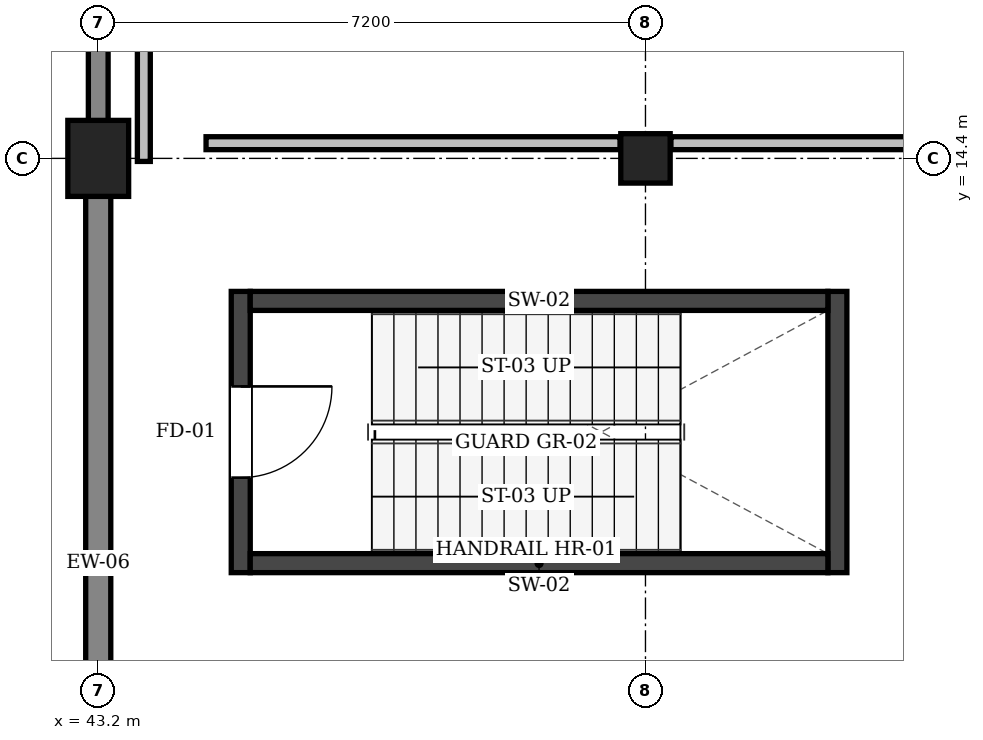
"""IFC4 building model, lengths in metres.
Left out: names, types, materials, properties, quantities, classifications, styles, units other than length and angle.
Written with IfcOpenShell. Run it as: python <this file> out.ifc"""

import sys

from ifc_helpers import new_model, si_unit, direction, frame, frame_2d, origin, origin_2d, place, context, subcontext, project, spatial, rectangle, extrude, element, fill, save


model = new_model("IFC4")
c1 = context("Model", 3, precision=1e-05, world=origin(), true_north=direction((0.0, 1.0)))
c2 = subcontext(c1, "Body", "Model", "MODEL_VIEW")
j1 = project(units=[si_unit("LENGTHUNIT", "METRE"), si_unit("PLANEANGLEUNIT", "RADIAN")], contexts=[c1])
p1 = place(None, origin())
s1 = spatial("IfcSite", under=j1, at=p1, CompositionType="ELEMENT")
p2 = place(p1, origin())
s2 = spatial("IfcBuilding", under=s1, at=p2, CompositionType="ELEMENT")
p3 = place(p2, frame((0.0, 0.0, 23.4)))
s3 = spatial("IfcBuildingStorey", under=s2, at=p3, CompositionType="ELEMENT", Elevation=23.4)
p4 = place(p3, frame((43.2, 14.4, 0.0), z_axis=(0.0, 0.0, 1.0), x_axis=(1.0, 0.0, 0.0)))
e1 = element("IfcColumn", 1, at=p4, inside=s3, PredefinedType="COLUMN", context=c2, shape_type="SweptSolid", body=[
    extrude(rectangle(XDim=0.8, YDim=1.0, at=origin_2d()), origin(), (0.0, 0.0, 1.0), 4.5),
])
p5 = place(p3, frame((50.4, 14.4, 0.0), z_axis=(0.0, 0.0, 1.0), x_axis=(1.0, 0.0, 0.0)))
e2 = element("IfcColumn", 2, at=p5, inside=s3, PredefinedType="COLUMN", context=c2, shape_type="SweptSolid", body=[
    extrude(rectangle(XDim=0.65, YDim=0.65, at=origin_2d()), origin(), (0.0, 0.0, 1.0), 4.5),
])
p6 = place(p3, frame((43.2, 7.2, 0.0), z_axis=(0.0, 0.0, 1.0), x_axis=(0.0, 1.0, 0.0)))
e3 = element("IfcWall", 3, at=p6, inside=s3, PredefinedType="SOLIDWALL", context=c2, shape_type="SweptSolid", body=[
    extrude(rectangle(XDim=7.2, YDim=0.33, at=frame_2d((3.6, 0.0))), origin(), (0.0, 0.0, 1.0), 4.22),
])
p7 = place(p3, frame((43.2, 14.4, 0.0), z_axis=(0.0, 0.0, 1.0), x_axis=(0.0, 1.0, 0.0)))
e4 = element("IfcWall", 4, at=p7, inside=s3, PredefinedType="SOLIDWALL", context=c2, shape_type="SweptSolid", body=[
    extrude(rectangle(XDim=7.2, YDim=0.26, at=frame_2d((3.6, 0.0))), origin(), (0.0, 0.0, 1.0), 4.22),
])
p8 = place(p7, frame((1.715, 0.0, 0.95)))
e5 = element("IfcOpeningElement", 5, at=p8, cuts=e4, PredefinedType="OPENING", context=c2, shape_type="SweptSolid", body=[
    extrude(rectangle(XDim=1.7, YDim=1.8, at=frame_2d((0.85, 0.9))), frame((0.0, 0.142, 0.0), z_axis=(0.0, -1.0, 0.0), x_axis=(1.0, 0.0, 0.0)), (0.0, 0.0, 1.0), 0.284),
])
p9 = place(p3, frame((45.075, 8.95, 0.0), z_axis=(0.0, 0.0, 1.0), x_axis=(0.0, 1.0, 0.0)))
e6 = element("IfcWall", 6, at=p9, inside=s3, PredefinedType="SHEAR", context=c2, shape_type="SweptSolid", body=[
    extrude(rectangle(XDim=3.7, YDim=0.25, at=frame_2d((1.85, 0.0))), origin(), (0.0, 0.0, 1.0), 4.25),
])
p10 = place(p9, frame((1.25, 0.0, 0.0)))
e7 = element("IfcOpeningElement", 7, at=p10, cuts=e6, PredefinedType="OPENING", context=c2, shape_type="SweptSolid", body=[
    extrude(rectangle(XDim=1.2, YDim=2.15, at=frame_2d((0.6, 1.075))), frame((0.0, 0.137, 0.0), z_axis=(0.0, -1.0, 0.0), x_axis=(1.0, 0.0, 0.0)), (0.0, 0.0, 1.0), 0.274),
])
p11 = place(p3, frame((52.925, 8.95, 0.0), z_axis=(0.0, 0.0, 1.0), x_axis=(0.0, 1.0, 0.0)))
e8 = element("IfcWall", 8, at=p11, inside=s3, PredefinedType="SHEAR", context=c2, shape_type="SweptSolid", body=[
    extrude(rectangle(XDim=3.7, YDim=0.25, at=frame_2d((1.85, 0.0))), origin(), (0.0, 0.0, 1.0), 4.25),
])
for number, where, z_axis, x_axis in (
    (9, (45.2, 9.075, 0.0), (0.0, 0.0, 1.0), (1.0, 0.0, 0.0)),
    (10, (45.2, 12.525, 0.0), (0.0, 0.0, 1.0), (1.0, 0.0, 0.0)),
):
    element("IfcWall", number, at=place(p3, frame(where, z_axis=z_axis, x_axis=x_axis)), inside=s3, PredefinedType="SHEAR", context=c2, shape_type="SweptSolid", body=[
        extrude(rectangle(XDim=7.6, YDim=0.25, at=frame_2d((3.8, 0.0))), origin(), (0.0, 0.0, 1.0), 4.25),
    ])
p12 = place(p3, frame((50.735, 14.6, 0.0), z_axis=(0.0, 0.0, 1.0), x_axis=(1.0, 0.0, 0.0)))
e11 = element("IfcWall", 11, at=p12, inside=s3, PredefinedType="PARTITIONING", context=c2, shape_type="SweptSolid", body=[
    extrude(rectangle(XDim=6.53, YDim=0.17, at=frame_2d((3.265, 0.0))), origin(), (0.0, 0.0, 1.0), 3.73),
])
p13 = place(p3, frame((44.618, 14.6, 0.0), z_axis=(0.0, 0.0, 1.0), x_axis=(1.0, 0.0, 0.0)))
e12 = element("IfcWall", 12, at=p13, inside=s3, PredefinedType="PARTITIONING", context=c2, shape_type="SweptSolid", body=[
    extrude(rectangle(XDim=5.447, YDim=0.17, at=frame_2d((2.723, 0.0))), origin(), (0.0, 0.0, 1.0), 3.73),
])
p14 = place(p3, frame((43.8, 14.36, 0.0), z_axis=(0.0, 0.0, 1.0), x_axis=(0.0, 1.0, 0.0)))
e13 = element("IfcWall", 13, at=p14, inside=s3, PredefinedType="PARTITIONING", context=c2, shape_type="SweptSolid", body=[
    extrude(rectangle(XDim=3.74, YDim=0.17, at=frame_2d((1.87, 0.0))), origin(), (0.0, 0.0, 1.0), 4.16),
])
p15 = place(p10, frame((1.2, 0.0, 0.0), z_axis=(0.0, 0.0, 1.0), x_axis=(-1.0, 0.0, 0.0)))
e14 = element("IfcDoor", 14, at=p15, inside=s3, OperationType="SINGLE_SWING_LEFT", PredefinedType="DOOR", context=c2, shape_type="SweptSolid", body=[
    extrude(rectangle(XDim=1.2, YDim=2.15, at=frame_2d((0.6, 1.075))), frame((0.0, 0.025, 0.0), z_axis=(0.0, -1.0, 0.0), x_axis=(1.0, 0.0, 0.0)), (0.0, 0.0, 1.0), 0.05),
])
fill(e7, e14)
save(model, sys.argv[1])
